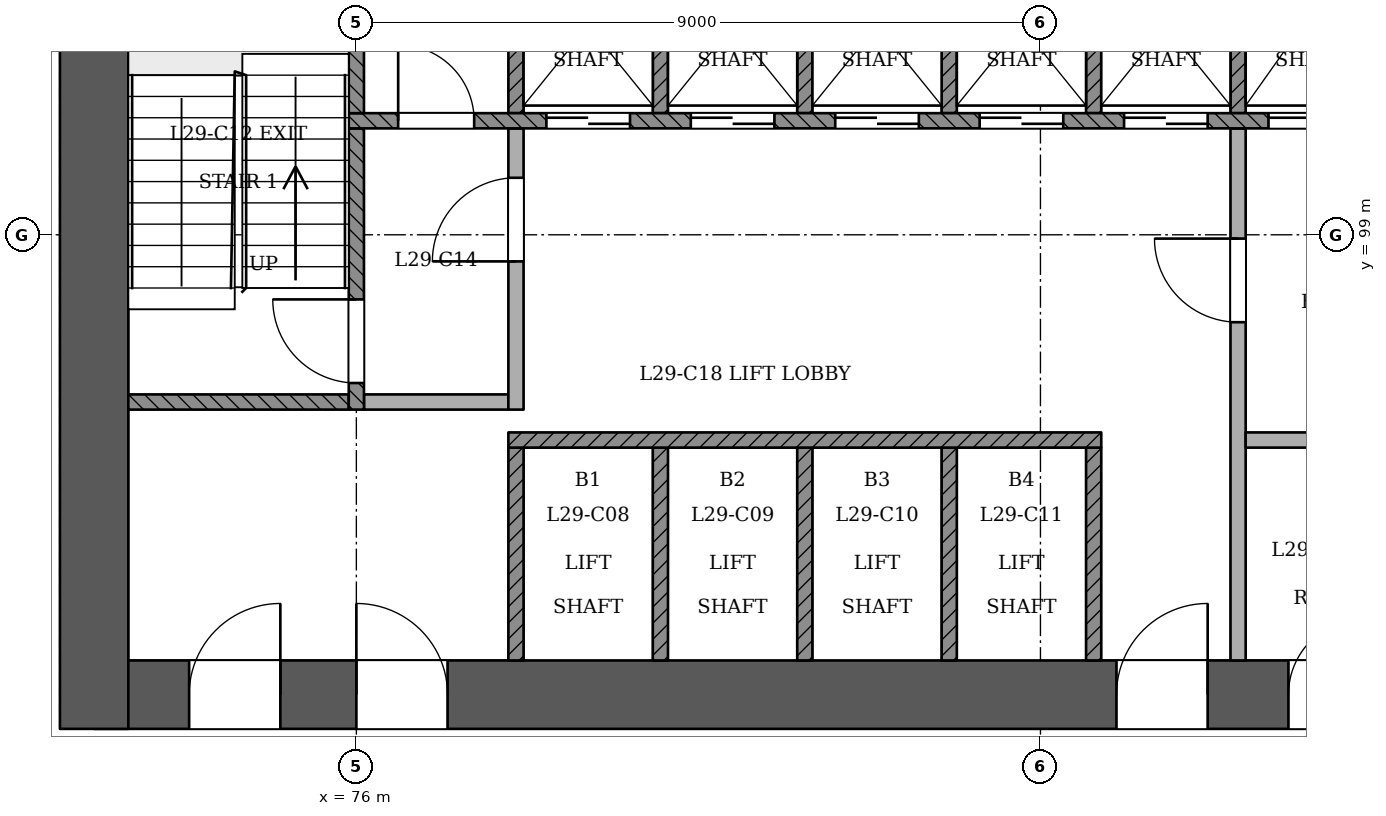
"""IFC4 building model, lengths in metres.
Left out: names, types, materials, properties, quantities, classifications, styles, units other than length and angle.
Written with IfcOpenShell. Run it as: python <this file> out.ifc"""

import sys

from ifc_helpers import new_model, si_unit, direction, frame, frame_2d, origin, place, context, subcontext, project, spatial, rectangle, extrude, element, fill, save


model = new_model("IFC4")
c1 = context("Model", 3, precision=1e-05, world=origin(), true_north=direction((0.0, 1.0)))
c2 = subcontext(c1, "Body", "Model", "MODEL_VIEW")
j1 = project(units=[si_unit("LENGTHUNIT", "METRE"), si_unit("PLANEANGLEUNIT", "RADIAN")], contexts=[c1])
p1 = place(None, origin())
s1 = spatial("IfcSite", under=j1, at=p1, CompositionType="ELEMENT")
p2 = place(p1, origin())
s2 = spatial("IfcBuilding", under=s1, at=p2, CompositionType="ELEMENT")
p3 = place(p2, frame((0.0, 0.0, 115.2)))
s3 = spatial("IfcBuildingStorey", under=s2, at=p3, CompositionType="ELEMENT", Elevation=115.2)
p4 = place(p3, frame((72.55, 92.95, 0.0), z_axis=(0.0, 0.0, 1.0), x_axis=(1.0, 0.0, 0.0)))
e1 = element("IfcWall", 1, at=p4, inside=s3, PredefinedType="SHEAR", context=c2, shape_type="SweptSolid", body=[
    extrude(rectangle(XDim=25.35, YDim=0.9, at=frame_2d((12.675, 0.0))), origin(), (0.0, 0.0, 1.0), 3.6),
])
p5 = place(p4, frame((1.25, 0.0, 0.0)))
e2 = element("IfcOpeningElement", 2, at=p5, cuts=e1, PredefinedType="OPENING", context=c2, shape_type="SweptSolid", body=[
    extrude(rectangle(XDim=1.2, YDim=2.1, at=frame_2d((0.6, 1.05))), frame((0.0, 0.46, 0.0), z_axis=(0.0, -1.0, 0.0), x_axis=(1.0, 0.0, 0.0)), (0.0, 0.0, 1.0), 0.921),
])
p6 = place(p4, frame((3.45, 0.0, 0.0)))
e3 = element("IfcOpeningElement", 3, at=p6, cuts=e1, PredefinedType="OPENING", context=c2, shape_type="SweptSolid", body=[
    extrude(rectangle(XDim=1.2, YDim=2.1, at=frame_2d((0.6, 1.05))), frame((0.0, 0.46, 0.0), z_axis=(0.0, -1.0, 0.0), x_axis=(1.0, 0.0, 0.0)), (0.0, 0.0, 1.0), 0.921),
])
p7 = place(p4, frame((13.45, 0.0, 0.0)))
e4 = element("IfcOpeningElement", 4, at=p7, cuts=e1, PredefinedType="OPENING", context=c2, shape_type="SweptSolid", body=[
    extrude(rectangle(XDim=1.2, YDim=2.1, at=frame_2d((0.6, 1.05))), frame((0.0, 0.46, 0.0), z_axis=(0.0, -1.0, 0.0), x_axis=(1.0, 0.0, 0.0)), (0.0, 0.0, 1.0), 0.921),
])
p8 = place(p4, frame((15.712, 0.0, 0.0)))
e5 = element("IfcOpeningElement", 5, at=p8, cuts=e1, PredefinedType="OPENING", context=c2, shape_type="SweptSolid", body=[
    extrude(rectangle(XDim=1.0, YDim=2.1, at=frame_2d((0.5, 1.05))), frame((0.0, 0.46, 0.0), z_axis=(0.0, -1.0, 0.0), x_axis=(1.0, 0.0, 0.0)), (0.0, 0.0, 1.0), 0.921),
])
p9 = place(p4, frame((18.35, 0.0, 0.0)))
e6 = element("IfcOpeningElement", 6, at=p9, cuts=e1, PredefinedType="OPENING", context=c2, shape_type="SweptSolid", body=[
    extrude(rectangle(XDim=1.0, YDim=2.1, at=frame_2d((0.5, 1.05))), frame((0.0, 0.46, 0.0), z_axis=(0.0, -1.0, 0.0), x_axis=(1.0, 0.0, 0.0)), (0.0, 0.0, 1.0), 0.921),
])
p10 = place(p4, frame((21.938, 0.0, 0.0)))
e7 = element("IfcOpeningElement", 7, at=p10, cuts=e1, PredefinedType="OPENING", context=c2, shape_type="SweptSolid", body=[
    extrude(rectangle(XDim=1.0, YDim=2.1, at=frame_2d((0.5, 1.05))), frame((0.0, 0.46, 0.0), z_axis=(0.0, -1.0, 0.0), x_axis=(1.0, 0.0, 0.0)), (0.0, 0.0, 1.0), 0.921),
])
p11 = place(p3, frame((72.55, 103.85, 0.0), z_axis=(0.0, 0.0, 1.0), x_axis=(0.0, -1.0, 0.0)))
e8 = element("IfcWall", 8, at=p11, inside=s3, PredefinedType="SHEAR", context=c2, shape_type="SweptSolid", body=[
    extrude(rectangle(XDim=11.35, YDim=0.9, at=frame_2d((5.675, 0.0))), origin(), (0.0, 0.0, 1.0), 3.6),
])
p12 = place(p3, frame((64.109, 97.973, 0.0), z_axis=(0.0, 0.0, 1.0), x_axis=(0.499997402089, -0.866026903684, 0.0)))
e9 = element("IfcWall", 9, at=p12, inside=s3, PredefinedType="PARTITIONING", context=c2, shape_type="SweptSolid", body=[
    extrude(rectangle(XDim=41.173, YDim=0.15, at=frame_2d((20.586, 0.0))), origin(), (0.0, 0.0, 1.0), 2.75),
])
p13 = place(p12, frame((0.273, 0.0, 0.0)))
e10 = element("IfcOpeningElement", 10, at=p13, cuts=e9, PredefinedType="OPENING", context=c2, shape_type="SweptSolid", body=[
    extrude(rectangle(XDim=1.2, YDim=2.1, at=frame_2d((0.6, 1.05))), frame((0.0, 0.085, 0.0), z_axis=(0.0, -1.0, 0.0), x_axis=(1.0, 0.0, 0.0)), (0.0, 0.0, 1.0), 0.171),
])
p14 = place(p12, frame((10.987, 0.0, 0.0)))
e11 = element("IfcOpeningElement", 11, at=p14, cuts=e9, PredefinedType="OPENING", context=c2, shape_type="SweptSolid", body=[
    extrude(rectangle(XDim=1.2, YDim=2.1, at=frame_2d((0.6, 1.05))), frame((0.0, 0.085, 0.0), z_axis=(0.0, -1.0, 0.0), x_axis=(1.0, 0.0, 0.0)), (0.0, 0.0, 1.0), 0.171),
])
p15 = place(p12, frame((22.237, 0.0, 0.0)))
e12 = element("IfcOpeningElement", 12, at=p15, cuts=e9, PredefinedType="OPENING", context=c2, shape_type="SweptSolid", body=[
    extrude(rectangle(XDim=1.2, YDim=2.1, at=frame_2d((0.6, 1.05))), frame((0.0, 0.085, 0.0), z_axis=(0.0, -1.0, 0.0), x_axis=(1.0, 0.0, 0.0)), (0.0, 0.0, 1.0), 0.171),
])
p16 = place(p12, frame((32.387, 0.0, 0.0)))
e13 = element("IfcOpeningElement", 13, at=p16, cuts=e9, PredefinedType="OPENING", context=c2, shape_type="SweptSolid", body=[
    extrude(rectangle(XDim=1.2, YDim=2.1, at=frame_2d((0.6, 1.05))), frame((0.0, 0.085, 0.0), z_axis=(0.0, -1.0, 0.0), x_axis=(1.0, 0.0, 0.0)), (0.0, 0.0, 1.0), 0.171),
])
p17 = place(p12, frame((39.95, 0.0, 0.0)))
e14 = element("IfcOpeningElement", 14, at=p17, cuts=e9, PredefinedType="OPENING", context=c2, shape_type="SweptSolid", body=[
    extrude(rectangle(XDim=1.0, YDim=2.1, at=frame_2d((0.5, 1.05))), frame((0.0, 0.085, 0.0), z_axis=(0.0, -1.0, 0.0), x_axis=(1.0, 0.0, 0.0)), (0.0, 0.0, 1.0), 0.171),
])
p18 = place(p3, frame((85.304, 62.316, 0.0), z_axis=(0.0, 0.0, 1.0), x_axis=(0.499997402089, 0.866026903684, 0.0)))
e15 = element("IfcWall", 15, at=p18, inside=s3, PredefinedType="PARTITIONING", context=c2, shape_type="SweptSolid", body=[
    extrude(rectangle(XDim=41.173, YDim=0.15, at=frame_2d((20.586, 0.0))), origin(), (0.0, 0.0, 1.0), 2.75),
])
p19 = place(p18, frame((0.248, 0.0, 0.0)))
e16 = element("IfcOpeningElement", 16, at=p19, cuts=e15, PredefinedType="OPENING", context=c2, shape_type="SweptSolid", body=[
    extrude(rectangle(XDim=1.2, YDim=2.1, at=frame_2d((0.6, 1.05))), frame((0.0, 0.085, 0.0), z_axis=(0.0, -1.0, 0.0), x_axis=(1.0, 0.0, 0.0)), (0.0, 0.0, 1.0), 0.171),
])
p20 = place(p18, frame((8.737, 0.0, 0.0)))
e17 = element("IfcOpeningElement", 17, at=p20, cuts=e15, PredefinedType="OPENING", context=c2, shape_type="SweptSolid", body=[
    extrude(rectangle(XDim=1.2, YDim=2.1, at=frame_2d((0.6, 1.05))), frame((0.0, 0.085, 0.0), z_axis=(0.0, -1.0, 0.0), x_axis=(1.0, 0.0, 0.0)), (0.0, 0.0, 1.0), 0.171),
])
p21 = place(p18, frame((22.237, 0.0, 0.0)))
e18 = element("IfcOpeningElement", 18, at=p21, cuts=e15, PredefinedType="OPENING", context=c2, shape_type="SweptSolid", body=[
    extrude(rectangle(XDim=1.2, YDim=2.1, at=frame_2d((0.6, 1.05))), frame((0.0, 0.085, 0.0), z_axis=(0.0, -1.0, 0.0), x_axis=(1.0, 0.0, 0.0)), (0.0, 0.0, 1.0), 0.171),
])
p22 = place(p18, frame((32.387, 0.0, 0.0)))
e19 = element("IfcOpeningElement", 19, at=p22, cuts=e15, PredefinedType="OPENING", context=c2, shape_type="SweptSolid", body=[
    extrude(rectangle(XDim=1.2, YDim=2.1, at=frame_2d((0.6, 1.05))), frame((0.0, 0.085, 0.0), z_axis=(0.0, -1.0, 0.0), x_axis=(1.0, 0.0, 0.0)), (0.0, 0.0, 1.0), 0.171),
])
p23 = place(p18, frame((39.725, 0.0, 0.0)))
e20 = element("IfcOpeningElement", 20, at=p23, cuts=e15, PredefinedType="OPENING", context=c2, shape_type="SweptSolid", body=[
    extrude(rectangle(XDim=1.2, YDim=2.1, at=frame_2d((0.6, 1.05))), frame((0.0, 0.085, 0.0), z_axis=(0.0, -1.0, 0.0), x_axis=(1.0, 0.0, 0.0)), (0.0, 0.0, 1.0), 0.171),
])
for number, where, z_axis, x_axis in (
    (21, (78.1, 93.4, 0.0), (0.0, 0.0, 1.0), (0.0, 1.0, 0.0)),
    (22, (80.0, 93.4, 0.0), (0.0, 0.0, 1.0), (0.0, 1.0, 0.0)),
    (23, (81.9, 93.4, 0.0), (0.0, 0.0, 1.0), (0.0, 1.0, 0.0)),
    (24, (83.8, 93.4, 0.0), (0.0, 0.0, 1.0), (0.0, 1.0, 0.0)),
    (25, (85.7, 93.4, 0.0), (0.0, 0.0, 1.0), (0.0, 1.0, 0.0)),
):
    element("IfcWall", number, at=place(p3, frame(where, z_axis=z_axis, x_axis=x_axis)), inside=s3, PredefinedType="SOLIDWALL", context=c2, shape_type="SweptSolid", body=[
        extrude(rectangle(XDim=2.8, YDim=0.2, at=frame_2d((1.4, 0.0))), origin(), (0.0, 0.0, 1.0), 3.15),
    ])
p24 = place(p3, frame((87.6, 93.4, 0.0), z_axis=(0.0, 0.0, 1.0), x_axis=(0.0, 1.0, 0.0)))
e26 = element("IfcWall", 26, at=p24, inside=s3, PredefinedType="PARTITIONING", context=c2, shape_type="SweptSolid", body=[
    extrude(rectangle(XDim=7.0, YDim=0.2, at=frame_2d((3.5, 0.0))), origin(), (0.0, 0.0, 1.0), 3.15),
])
p25 = place(p24, frame((4.45, 0.0, 0.0)))
e27 = element("IfcOpeningElement", 27, at=p25, cuts=e26, PredefinedType="OPENING", context=c2, shape_type="SweptSolid", body=[
    extrude(rectangle(XDim=1.1, YDim=2.1, at=frame_2d((0.55, 1.05))), frame((0.0, 0.11, 0.0), z_axis=(0.0, -1.0, 0.0), x_axis=(1.0, 0.0, 0.0)), (0.0, 0.0, 1.0), 0.221),
])
p26 = place(p3, frame((78.0, 96.3, 0.0), z_axis=(0.0, 0.0, 1.0), x_axis=(1.0, 0.0, 0.0)))
e28 = element("IfcWall", 28, at=p26, inside=s3, PredefinedType="SOLIDWALL", context=c2, shape_type="SweptSolid", body=[
    extrude(rectangle(XDim=7.8, YDim=0.2, at=frame_2d((3.9, 0.0))), origin(), (0.0, 0.0, 1.0), 3.15),
])
p27 = place(p3, frame((87.7, 96.3, 0.0), z_axis=(0.0, 0.0, 1.0), x_axis=(1.0, 0.0, 0.0)))
e29 = element("IfcWall", 29, at=p27, inside=s3, PredefinedType="PARTITIONING", context=c2, shape_type="SweptSolid", body=[
    extrude(rectangle(XDim=3.6, YDim=0.2, at=frame_2d((1.8, 0.0))), origin(), (0.0, 0.0, 1.0), 3.15),
])
p28 = place(p3, frame((73.0, 96.8, 0.0), z_axis=(0.0, 0.0, 1.0), x_axis=(1.0, 0.0, 0.0)))
e30 = element("IfcWall", 30, at=p28, inside=s3, PredefinedType="SOLIDWALL", context=c2, shape_type="SweptSolid", body=[
    extrude(rectangle(XDim=2.9, YDim=0.2, at=frame_2d((1.45, 0.0))), origin(), (0.0, 0.0, 1.0), 3.15),
])
p29 = place(p3, frame((76.0, 96.7, 0.0), z_axis=(0.0, 0.0, 1.0), x_axis=(0.0, 1.0, 0.0)))
e31 = element("IfcWall", 31, at=p29, inside=s3, PredefinedType="SOLIDWALL", context=c2, shape_type="SweptSolid", body=[
    extrude(rectangle(XDim=3.7, YDim=0.2, at=frame_2d((1.85, 0.0))), origin(), (0.0, 0.0, 1.0), 3.15),
])
p30 = place(p29, frame((0.35, 0.0, 0.0)))
e32 = element("IfcOpeningElement", 32, at=p30, cuts=e31, PredefinedType="OPENING", context=c2, shape_type="SweptSolid", body=[
    extrude(rectangle(XDim=1.1, YDim=2.1, at=frame_2d((0.55, 1.05))), frame((0.0, 0.11, 0.0), z_axis=(0.0, -1.0, 0.0), x_axis=(1.0, 0.0, 0.0)), (0.0, 0.0, 1.0), 0.221),
])
p31 = place(p3, frame((76.1, 96.8, 0.0), z_axis=(0.0, 0.0, 1.0), x_axis=(1.0, 0.0, 0.0)))
e33 = element("IfcWall", 33, at=p31, inside=s3, PredefinedType="PARTITIONING", context=c2, shape_type="SweptSolid", body=[
    extrude(rectangle(XDim=1.9, YDim=0.2, at=frame_2d((0.95, 0.0))), origin(), (0.0, 0.0, 1.0), 3.15),
])
p32 = place(p3, frame((78.1, 96.7, 0.0), z_axis=(0.0, 0.0, 1.0), x_axis=(0.0, 1.0, 0.0)))
e34 = element("IfcWall", 34, at=p32, inside=s3, PredefinedType="PARTITIONING", context=c2, shape_type="SweptSolid", body=[
    extrude(rectangle(XDim=3.7, YDim=0.2, at=frame_2d((1.85, 0.0))), origin(), (0.0, 0.0, 1.0), 3.15),
])
p33 = place(p32, frame((1.95, 0.0, 0.0)))
e35 = element("IfcOpeningElement", 35, at=p33, cuts=e34, PredefinedType="OPENING", context=c2, shape_type="SweptSolid", body=[
    extrude(rectangle(XDim=1.1, YDim=2.1, at=frame_2d((0.55, 1.05))), frame((0.0, 0.11, 0.0), z_axis=(0.0, -1.0, 0.0), x_axis=(1.0, 0.0, 0.0)), (0.0, 0.0, 1.0), 0.221),
])
p34 = place(p3, frame((75.9, 100.5, 0.0), z_axis=(0.0, 0.0, 1.0), x_axis=(1.0, 0.0, 0.0)))
e36 = element("IfcWall", 36, at=p34, inside=s3, PredefinedType="SOLIDWALL", context=c2, shape_type="SweptSolid", body=[
    extrude(rectangle(XDim=18.2, YDim=0.2, at=frame_2d((9.1, 0.0))), origin(), (0.0, 0.0, 1.0), 3.15),
])
p35 = place(p34, frame((2.6, 0.0, 0.0)))
e37 = element("IfcOpeningElement", 37, at=p35, cuts=e36, PredefinedType="OPENING", context=c2, shape_type="SweptSolid", body=[
    extrude(rectangle(XDim=1.1, YDim=2.1, at=frame_2d((0.55, 1.05))), frame((0.0, 0.11, 0.0), z_axis=(0.0, -1.0, 0.0), x_axis=(1.0, 0.0, 0.0)), (0.0, 0.0, 1.0), 0.221),
])
p36 = place(p34, frame((4.5, 0.0, 0.0)))
e38 = element("IfcOpeningElement", 38, at=p36, cuts=e36, PredefinedType="OPENING", context=c2, shape_type="SweptSolid", body=[
    extrude(rectangle(XDim=1.1, YDim=2.1, at=frame_2d((0.55, 1.05))), frame((0.0, 0.11, 0.0), z_axis=(0.0, -1.0, 0.0), x_axis=(1.0, 0.0, 0.0)), (0.0, 0.0, 1.0), 0.221),
])
p37 = place(p34, frame((6.4, 0.0, 0.0)))
e39 = element("IfcOpeningElement", 39, at=p37, cuts=e36, PredefinedType="OPENING", context=c2, shape_type="SweptSolid", body=[
    extrude(rectangle(XDim=1.1, YDim=2.1, at=frame_2d((0.55, 1.05))), frame((0.0, 0.11, 0.0), z_axis=(0.0, -1.0, 0.0), x_axis=(1.0, 0.0, 0.0)), (0.0, 0.0, 1.0), 0.221),
])
p38 = place(p34, frame((8.3, 0.0, 0.0)))
e40 = element("IfcOpeningElement", 40, at=p38, cuts=e36, PredefinedType="OPENING", context=c2, shape_type="SweptSolid", body=[
    extrude(rectangle(XDim=1.1, YDim=2.1, at=frame_2d((0.55, 1.05))), frame((0.0, 0.11, 0.0), z_axis=(0.0, -1.0, 0.0), x_axis=(1.0, 0.0, 0.0)), (0.0, 0.0, 1.0), 0.221),
])
p39 = place(p34, frame((10.2, 0.0, 0.0)))
e41 = element("IfcOpeningElement", 41, at=p39, cuts=e36, PredefinedType="OPENING", context=c2, shape_type="SweptSolid", body=[
    extrude(rectangle(XDim=1.1, YDim=2.1, at=frame_2d((0.55, 1.05))), frame((0.0, 0.11, 0.0), z_axis=(0.0, -1.0, 0.0), x_axis=(1.0, 0.0, 0.0)), (0.0, 0.0, 1.0), 0.221),
])
p40 = place(p34, frame((12.1, 0.0, 0.0)))
e42 = element("IfcOpeningElement", 42, at=p40, cuts=e36, PredefinedType="OPENING", context=c2, shape_type="SweptSolid", body=[
    extrude(rectangle(XDim=1.1, YDim=2.1, at=frame_2d((0.55, 1.05))), frame((0.0, 0.11, 0.0), z_axis=(0.0, -1.0, 0.0), x_axis=(1.0, 0.0, 0.0)), (0.0, 0.0, 1.0), 0.221),
])
p41 = place(p34, frame((14.0, 0.0, 0.0)))
e43 = element("IfcOpeningElement", 43, at=p41, cuts=e36, PredefinedType="OPENING", context=c2, shape_type="SweptSolid", body=[
    extrude(rectangle(XDim=1.1, YDim=2.1, at=frame_2d((0.55, 1.05))), frame((0.0, 0.11, 0.0), z_axis=(0.0, -1.0, 0.0), x_axis=(1.0, 0.0, 0.0)), (0.0, 0.0, 1.0), 0.221),
])
p42 = place(p34, frame((0.65, 0.0, 0.0)))
e44 = element("IfcOpeningElement", 44, at=p42, cuts=e36, PredefinedType="OPENING", context=c2, shape_type="SweptSolid", body=[
    extrude(rectangle(XDim=1.0, YDim=2.1, at=frame_2d((0.5, 1.05))), frame((0.0, 0.11, 0.0), z_axis=(0.0, -1.0, 0.0), x_axis=(1.0, 0.0, 0.0)), (0.0, 0.0, 1.0), 0.221),
])
p43 = place(p34, frame((16.3, 0.0, 0.0)))
e45 = element("IfcOpeningElement", 45, at=p43, cuts=e36, PredefinedType="OPENING", context=c2, shape_type="SweptSolid", body=[
    extrude(rectangle(XDim=1.0, YDim=2.1, at=frame_2d((0.5, 1.05))), frame((0.0, 0.11, 0.0), z_axis=(0.0, -1.0, 0.0), x_axis=(1.0, 0.0, 0.0)), (0.0, 0.0, 1.0), 0.221),
])
for number, where, z_axis, x_axis in (
    (46, (76.0, 100.6, 0.0), (0.0, 0.0, 1.0), (0.0, 1.0, 0.0)),
    (47, (78.1, 100.6, 0.0), (0.0, 0.0, 1.0), (0.0, 1.0, 0.0)),
    (48, (80.0, 100.6, 0.0), (0.0, 0.0, 1.0), (0.0, 1.0, 0.0)),
    (49, (81.9, 100.6, 0.0), (0.0, 0.0, 1.0), (0.0, 1.0, 0.0)),
    (50, (83.8, 100.6, 0.0), (0.0, 0.0, 1.0), (0.0, 1.0, 0.0)),
    (51, (85.7, 100.6, 0.0), (0.0, 0.0, 1.0), (0.0, 1.0, 0.0)),
    (52, (87.6, 100.6, 0.0), (0.0, 0.0, 1.0), (0.0, 1.0, 0.0)),
):
    element("IfcWall", number, at=place(p3, frame(where, z_axis=z_axis, x_axis=x_axis)), inside=s3, PredefinedType="SOLIDWALL", context=c2, shape_type="SweptSolid", body=[
        extrude(rectangle(XDim=2.8, YDim=0.2, at=frame_2d((1.4, 0.0))), origin(), (0.0, 0.0, 1.0), 3.15),
    ])
p44 = place(p35, origin())
e53 = element("IfcDoor", 53, at=p44, inside=s3, OperationType="SLIDING_TO_RIGHT", PredefinedType="NOTDEFINED", context=c2, shape_type="SweptSolid", body=[
    extrude(rectangle(XDim=1.1, YDim=2.1, at=frame_2d((0.55, 1.05))), frame((0.0, 0.025, 0.0), z_axis=(0.0, -1.0, 0.0), x_axis=(1.0, 0.0, 0.0)), (0.0, 0.0, 1.0), 0.05),
])
fill(e37, e53)
p45 = place(p36, origin())
e54 = element("IfcDoor", 54, at=p45, inside=s3, OperationType="SLIDING_TO_LEFT", PredefinedType="NOTDEFINED", context=c2, shape_type="SweptSolid", body=[
    extrude(rectangle(XDim=1.1, YDim=2.1, at=frame_2d((0.55, 1.05))), frame((0.0, 0.025, 0.0), z_axis=(0.0, -1.0, 0.0), x_axis=(1.0, 0.0, 0.0)), (0.0, 0.0, 1.0), 0.05),
])
fill(e38, e54)
p46 = place(p37, origin())
e55 = element("IfcDoor", 55, at=p46, inside=s3, OperationType="SLIDING_TO_RIGHT", PredefinedType="NOTDEFINED", context=c2, shape_type="SweptSolid", body=[
    extrude(rectangle(XDim=1.1, YDim=2.1, at=frame_2d((0.55, 1.05))), frame((0.0, 0.025, 0.0), z_axis=(0.0, -1.0, 0.0), x_axis=(1.0, 0.0, 0.0)), (0.0, 0.0, 1.0), 0.05),
])
fill(e39, e55)
p47 = place(p38, origin())
e56 = element("IfcDoor", 56, at=p47, inside=s3, OperationType="SLIDING_TO_LEFT", PredefinedType="NOTDEFINED", context=c2, shape_type="SweptSolid", body=[
    extrude(rectangle(XDim=1.1, YDim=2.1, at=frame_2d((0.55, 1.05))), frame((0.0, 0.025, 0.0), z_axis=(0.0, -1.0, 0.0), x_axis=(1.0, 0.0, 0.0)), (0.0, 0.0, 1.0), 0.05),
])
fill(e40, e56)
p48 = place(p39, origin())
e57 = element("IfcDoor", 57, at=p48, inside=s3, OperationType="SLIDING_TO_RIGHT", PredefinedType="NOTDEFINED", context=c2, shape_type="SweptSolid", body=[
    extrude(rectangle(XDim=1.1, YDim=2.1, at=frame_2d((0.55, 1.05))), frame((0.0, 0.025, 0.0), z_axis=(0.0, -1.0, 0.0), x_axis=(1.0, 0.0, 0.0)), (0.0, 0.0, 1.0), 0.05),
])
fill(e41, e57)
p49 = place(p40, origin())
e58 = element("IfcDoor", 58, at=p49, inside=s3, OperationType="SLIDING_TO_RIGHT", PredefinedType="NOTDEFINED", context=c2, shape_type="SweptSolid", body=[
    extrude(rectangle(XDim=1.1, YDim=2.1, at=frame_2d((0.55, 1.05))), frame((0.0, 0.025, 0.0), z_axis=(0.0, -1.0, 0.0), x_axis=(1.0, 0.0, 0.0)), (0.0, 0.0, 1.0), 0.05),
])
fill(e42, e58)
p50 = place(p30, origin())
e59 = element("IfcDoor", 59, at=p50, inside=s3, OperationType="SINGLE_SWING_RIGHT", PredefinedType="NOTDEFINED", context=c2, shape_type="SweptSolid", body=[
    extrude(rectangle(XDim=1.1, YDim=2.1, at=frame_2d((0.55, 1.05))), frame((0.0, 0.025, 0.0), z_axis=(0.0, -1.0, 0.0), x_axis=(1.0, 0.0, 0.0)), (0.0, 0.0, 1.0), 0.05),
])
fill(e32, e59)
p51 = place(p33, origin())
e60 = element("IfcDoor", 60, at=p51, inside=s3, OperationType="SINGLE_SWING_LEFT", PredefinedType="NOTDEFINED", context=c2, shape_type="SweptSolid", body=[
    extrude(rectangle(XDim=1.1, YDim=2.1, at=frame_2d((0.55, 1.05))), frame((0.0, 0.025, 0.0), z_axis=(0.0, -1.0, 0.0), x_axis=(1.0, 0.0, 0.0)), (0.0, 0.0, 1.0), 0.05),
])
fill(e35, e60)
p52 = place(p25, origin())
e61 = element("IfcDoor", 61, at=p52, inside=s3, OperationType="SINGLE_SWING_RIGHT", PredefinedType="NOTDEFINED", context=c2, shape_type="SweptSolid", body=[
    extrude(rectangle(XDim=1.1, YDim=2.1, at=frame_2d((0.55, 1.05))), frame((0.0, 0.025, 0.0), z_axis=(0.0, -1.0, 0.0), x_axis=(1.0, 0.0, 0.0)), (0.0, 0.0, 1.0), 0.05),
])
fill(e27, e61)
p53 = place(p5, origin())
e62 = element("IfcDoor", 62, at=p53, inside=s3, OperationType="SINGLE_SWING_RIGHT", PredefinedType="NOTDEFINED", context=c2, shape_type="SweptSolid", body=[
    extrude(rectangle(XDim=1.2, YDim=2.1, at=frame_2d((0.6, 1.05))), frame((0.0, 0.025, 0.0), z_axis=(0.0, -1.0, 0.0), x_axis=(1.0, 0.0, 0.0)), (0.0, 0.0, 1.0), 0.05),
])
fill(e2, e62)
p54 = place(p6, origin())
e63 = element("IfcDoor", 63, at=p54, inside=s3, OperationType="SINGLE_SWING_LEFT", PredefinedType="NOTDEFINED", context=c2, shape_type="SweptSolid", body=[
    extrude(rectangle(XDim=1.2, YDim=2.1, at=frame_2d((0.6, 1.05))), frame((0.0, 0.025, 0.0), z_axis=(0.0, -1.0, 0.0), x_axis=(1.0, 0.0, 0.0)), (0.0, 0.0, 1.0), 0.05),
])
fill(e3, e63)
p55 = place(p7, origin())
e64 = element("IfcDoor", 64, at=p55, inside=s3, OperationType="SINGLE_SWING_RIGHT", PredefinedType="NOTDEFINED", context=c2, shape_type="SweptSolid", body=[
    extrude(rectangle(XDim=1.2, YDim=2.1, at=frame_2d((0.6, 1.05))), frame((0.0, 0.025, 0.0), z_axis=(0.0, -1.0, 0.0), x_axis=(1.0, 0.0, 0.0)), (0.0, 0.0, 1.0), 0.05),
])
fill(e4, e64)
p56 = place(p42, origin())
e65 = element("IfcDoor", 65, at=p56, inside=s3, OperationType="SINGLE_SWING_LEFT", PredefinedType="NOTDEFINED", context=c2, shape_type="SweptSolid", body=[
    extrude(rectangle(XDim=1.0, YDim=2.1, at=frame_2d((0.5, 1.05))), frame((0.0, 0.025, 0.0), z_axis=(0.0, -1.0, 0.0), x_axis=(1.0, 0.0, 0.0)), (0.0, 0.0, 1.0), 0.05),
])
fill(e44, e65)
p57 = place(p8, origin())
e66 = element("IfcDoor", 66, at=p57, inside=s3, OperationType="SINGLE_SWING_RIGHT", PredefinedType="NOTDEFINED", context=c2, shape_type="SweptSolid", body=[
    extrude(rectangle(XDim=1.0, YDim=2.1, at=frame_2d((0.5, 1.05))), frame((0.0, 0.025, 0.0), z_axis=(0.0, -1.0, 0.0), x_axis=(1.0, 0.0, 0.0)), (0.0, 0.0, 1.0), 0.05),
])
fill(e5, e66)
save(model, sys.argv[1])
